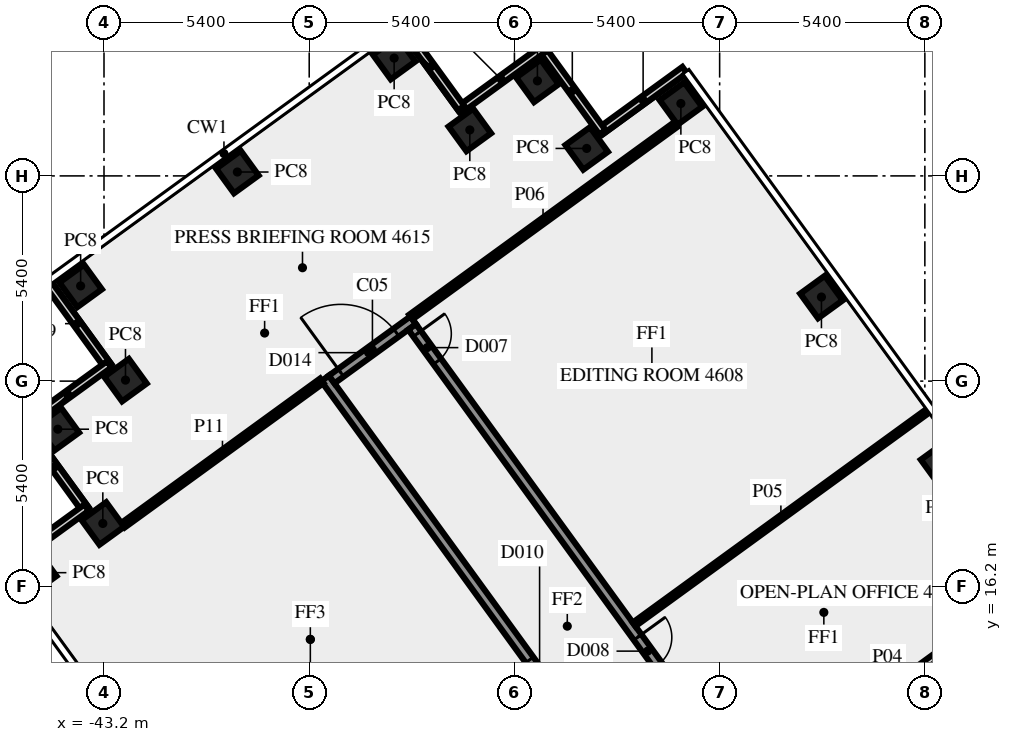
"""IFC4 building model, lengths in metres.
Left out: names, types, materials, properties, quantities, classifications, styles, units other than length and angle.
Written with IfcOpenShell. Run it as: python <this file> out.ifc"""

import sys

from ifc_helpers import new_model, si_unit, direction, frame, frame_2d, origin, origin_2d, place, context, subcontext, project, spatial, rectangle, extrude, element, fill, save


model = new_model("IFC4")
c1 = context("Model", 3, precision=1e-05, world=origin(), true_north=direction((0.0, 1.0)))
c2 = subcontext(c1, "Body", "Model", "MODEL_VIEW")
j1 = project(units=[si_unit("LENGTHUNIT", "METRE"), si_unit("PLANEANGLEUNIT", "RADIAN")], contexts=[c1])
p1 = place(None, origin())
s1 = spatial("IfcSite", under=j1, at=p1, CompositionType="ELEMENT")
p2 = place(p1, origin())
s2 = spatial("IfcBuilding", under=s1, at=p2, CompositionType="ELEMENT")
p3 = place(p2, frame((0.0, 0.0, 198.0)))
s3 = spatial("IfcBuildingStorey", under=s2, at=p3, CompositionType="ELEMENT", Elevation=198.0)
for number, where, z_axis, x_axis in (
    (1, (-21.147, 19.444, 0.0), (0.0, 0.0, 1.0), (-0.588, 0.809, 0.0)),
    (2, (-24.321, 23.812, 0.0), (0.0, 0.0, 1.0), (-0.588, 0.809, 0.0)),
    (3, (-28.02, 28.905, 0.0), (0.0, 0.0, 1.0), (-0.809, -0.588, 0.0)),
    (4, (-30.499, 27.723, 0.0), (0.0, 0.0, 1.0), (-0.809, -0.588, 0.0)),
    (5, (-31.795, 29.5, 0.0), (0.0, 0.0, 1.0), (-0.588, 0.809, 0.0)),
    (6, (-33.574, 28.209, 0.0), (0.0, 0.0, 1.0), (-0.588, 0.809, 0.0)),
    (7, (-35.565, 30.1, 0.0), (0.0, 0.0, 1.0), (-0.809, -0.588, 0.0)),
    (8, (-39.691, 27.102, 0.0), (0.0, 0.0, 1.0), (-0.809, -0.588, 0.0)),
    (9, (-43.815, 24.105, 0.0), (0.0, 0.0, 1.0), (-0.809, -0.588, 0.0)),
    (10, (-42.635, 21.626, 0.0), (0.0, 0.0, 1.0), (-0.809, -0.588, 0.0)),
    (11, (-44.415, 20.335, 0.0), (0.0, 0.0, 1.0), (0.588, -0.809, 0.0)),
    (12, (-43.231, 17.854, 0.0), (0.0, 0.0, 1.0), (0.588, -0.809, 0.0)),
    (13, (-45.01, 16.56, 0.0), (0.0, 0.0, 1.0), (0.588, -0.809, 0.0)),
):
    element("IfcColumn", number, at=place(p3, frame(where, z_axis=z_axis, x_axis=x_axis)), inside=s3, PredefinedType="COLUMN", context=c2, shape_type="SweptSolid", body=[
        extrude(rectangle(XDim=0.8, YDim=0.8, at=origin_2d()), origin(), (0.0, 0.0, 1.0), 3.65),
    ])
for number, where, z_axis, x_axis in (
    (14, (-27.921, 29.787, 0.0), (0.0, 0.0, 1.0), (-0.809, -0.588, 0.0)),
    (15, (-30.083, 28.149, 0.0), (0.0, 0.0, 1.0), (-0.588, 0.809, 0.0)),
    (16, (-31.654, 30.331, 0.0), (0.0, 0.0, 1.0), (-0.809, -0.588, 0.0)),
    (17, (-33.801, 28.786, 0.0), (0.0, 0.0, 1.0), (-0.588, 0.809, 0.0)),
    (18, (-44.699, 24.205, 0.0), (0.0, 0.0, 1.0), (0.588, -0.809, 0.0)),
    (19, (-43.061, 22.043, 0.0), (0.0, 0.0, 1.0), (-0.809, -0.588, 0.0)),
    (20, (-45.296, 20.434, 0.0), (0.0, 0.0, 1.0), (0.588, -0.809, 0.0)),
    (21, (-43.658, 18.272, 0.0), (0.0, 0.0, 1.0), (-0.809, -0.588, 0.0)),
):
    element("IfcWall", number, at=place(p3, frame(where, z_axis=z_axis, x_axis=x_axis)), inside=s3, PredefinedType="SOLIDWALL", context=c2, shape_type="SweptSolid", body=[
        extrude(rectangle(XDim=2.7, YDim=0.2, at=frame_2d((1.35, 0.0))), origin(), (0.0, 0.0, 1.0), 3.65),
    ])
p4 = place(p3, frame((-20.531, -1.523, 0.0), z_axis=(0.0, 0.0, 1.0), x_axis=(-0.587785812891, 0.809016587076, 0.0)))
e22 = element("IfcWall", 22, at=p4, inside=s3, PredefinedType="SOLIDWALL", context=c2, shape_type="SweptSolid", body=[
    extrude(rectangle(XDim=28.67, YDim=0.25, at=frame_2d((14.335, 0.0))), origin(), (0.0, 0.0, 1.0), 3.65),
])
p5 = place(p4, frame((17.015, 0.0, 0.0)))
e23 = element("IfcOpeningElement", 23, at=p5, cuts=e22, PredefinedType="OPENING", context=c2, shape_type="SweptSolid", body=[
    extrude(rectangle(XDim=0.9, YDim=2.1, at=frame_2d((0.45, 1.05))), frame((0.0, 0.135, 0.0), z_axis=(0.0, -1.0, 0.0), x_axis=(1.0, 0.0, 0.0)), (0.0, 0.0, 1.0), 0.27),
])
p6 = place(p4, frame((8.916, 0.0, 0.0)))
e24 = element("IfcOpeningElement", 24, at=p6, cuts=e22, PredefinedType="OPENING", context=c2, shape_type="SweptSolid", body=[
    extrude(rectangle(XDim=0.9, YDim=2.1, at=frame_2d((0.45, 1.05))), frame((0.0, 0.135, 0.0), z_axis=(0.0, -1.0, 0.0), x_axis=(1.0, 0.0, 0.0)), (0.0, 0.0, 1.0), 0.27),
])
p7 = place(p4, frame((18.616, 0.0, 0.0)))
e25 = element("IfcOpeningElement", 25, at=p7, cuts=e22, PredefinedType="OPENING", context=c2, shape_type="SweptSolid", body=[
    extrude(rectangle(XDim=0.9, YDim=2.1, at=frame_2d((0.45, 1.05))), frame((0.0, 0.135, 0.0), z_axis=(0.0, -1.0, 0.0), x_axis=(1.0, 0.0, 0.0)), (0.0, 0.0, 1.0), 0.27),
])
p8 = place(p4, frame((11.615, 0.0, 0.0)))
e26 = element("IfcOpeningElement", 26, at=p8, cuts=e22, PredefinedType="OPENING", context=c2, shape_type="SweptSolid", body=[
    extrude(rectangle(XDim=0.9, YDim=2.1, at=frame_2d((0.45, 1.05))), frame((0.0, 0.135, 0.0), z_axis=(0.0, -1.0, 0.0), x_axis=(1.0, 0.0, 0.0)), (0.0, 0.0, 1.0), 0.27),
])
p9 = place(p3, frame((-37.208, 21.644, 0.0), z_axis=(0.0, 0.0, 1.0), x_axis=(0.809038743598, 0.587755315891, 0.0)))
e27 = element("IfcWall", 27, at=p9, inside=s3, PredefinedType="SOLIDWALL", context=c2, shape_type="SweptSolid", body=[
    extrude(rectangle(XDim=2.65, YDim=0.25, at=frame_2d((1.325, 0.0))), origin(), (0.0, 0.0, 1.0), 3.65),
])
p10 = place(p9, frame((0.3, 0.0, 0.0)))
e28 = element("IfcOpeningElement", 28, at=p10, cuts=e27, PredefinedType="OPENING", context=c2, shape_type="SweptSolid", body=[
    extrude(rectangle(XDim=1.8, YDim=2.1, at=frame_2d((0.9, 1.05))), frame((0.0, 0.135, 0.0), z_axis=(0.0, -1.0, 0.0), x_axis=(1.0, 0.0, 0.0)), (0.0, 0.0, 1.0), 0.27),
])
p11 = place(p3, frame((-35.092, 23.027, 0.0), z_axis=(0.0, 0.0, 1.0), x_axis=(0.587784076945, -0.809017848313, 0.0)))
e29 = element("IfcWall", 29, at=p11, inside=s3, PredefinedType="SOLIDWALL", context=c2, shape_type="SweptSolid", body=[
    extrude(rectangle(XDim=29.853, YDim=0.25, at=frame_2d((14.927, 0.0))), origin(), (0.0, 0.0, 1.0), 3.65),
])
p12 = place(p11, frame((10.095, 0.0, 0.0)))
e30 = element("IfcOpeningElement", 30, at=p12, cuts=e29, PredefinedType="OPENING", context=c2, shape_type="SweptSolid", body=[
    extrude(rectangle(XDim=0.9, YDim=2.1, at=frame_2d((0.45, 1.05))), frame((0.0, 0.135, 0.0), z_axis=(0.0, -1.0, 0.0), x_axis=(1.0, 0.0, 0.0)), (0.0, 0.0, 1.0), 0.27),
])
p13 = place(p11, frame((15.495, 0.0, 0.0)))
e31 = element("IfcOpeningElement", 31, at=p13, cuts=e29, PredefinedType="OPENING", context=c2, shape_type="SweptSolid", body=[
    extrude(rectangle(XDim=0.9, YDim=2.1, at=frame_2d((0.45, 1.05))), frame((0.0, 0.135, 0.0), z_axis=(0.0, -1.0, 0.0), x_axis=(1.0, 0.0, 0.0)), (0.0, 0.0, 1.0), 0.27),
])
p14 = place(p11, frame((0.224, 0.0, 0.0)))
e32 = element("IfcOpeningElement", 32, at=p14, cuts=e29, PredefinedType="OPENING", context=c2, shape_type="SweptSolid", body=[
    extrude(rectangle(XDim=0.9, YDim=2.1, at=frame_2d((0.45, 1.05))), frame((0.0, 0.135, 0.0), z_axis=(0.0, -1.0, 0.0), x_axis=(1.0, 0.0, 0.0)), (0.0, 0.0, 1.0), 0.27),
])
p15 = place(p3, frame((-26.089, 10.848, 0.0), z_axis=(0.0, 0.0, 1.0), x_axis=(0.807661302092, 0.589646691759, 0.0)))
e33 = element("IfcWall", 33, at=p15, inside=s3, PredefinedType="SOLIDWALL", context=c2, shape_type="SweptSolid", body=[
    extrude(rectangle(XDim=9.55, YDim=0.2, at=frame_2d((4.775, 0.0))), origin(), (0.0, 0.0, 1.0), 2.85),
])
p16 = place(p3, frame((-21.525, 20.813, 0.0), z_axis=(0.0, 0.0, 1.0), x_axis=(-0.808994684961, -0.587815957341, 0.0)))
e34 = element("IfcWall", 34, at=p16, inside=s3, PredefinedType="PARTITIONING", context=c2, shape_type="SweptSolid", body=[
    extrude(rectangle(XDim=9.55, YDim=0.12, at=frame_2d((4.775, 0.0))), origin(), (0.0, 0.0, 1.0), 2.85),
])
p17 = place(p3, frame((-28.168, 28.341, 0.0), z_axis=(0.0, 0.0, 1.0), x_axis=(-0.809030614944, -0.58776650473, 0.0)))
e35 = element("IfcWall", 35, at=p17, inside=s3, PredefinedType="PARTITIONING", context=c2, shape_type="SweptSolid", body=[
    extrude(rectangle(XDim=8.6, YDim=0.15, at=frame_2d((4.3, 0.0))), origin(), (0.0, 0.0, 1.0), 3.65),
])
p18 = place(p3, frame((-42.698, 17.81, 0.0), z_axis=(0.0, 0.0, 1.0), x_axis=(0.80901688725, 0.587785399737, 0.0)))
e36 = element("IfcWall", 36, at=p18, inside=s3, PredefinedType="PARTITIONING", context=c2, shape_type="SweptSolid", body=[
    extrude(rectangle(XDim=6.465, YDim=0.15, at=frame_2d((3.232, 0.0))), origin(), (0.0, 0.0, 1.0), 3.65),
])
p19 = place(p12, origin())
e37 = element("IfcDoor", 37, at=p19, inside=s3, OperationType="SINGLE_SWING_LEFT", PredefinedType="DOOR", context=c2, shape_type="SweptSolid", body=[
    extrude(rectangle(XDim=0.9, YDim=2.1, at=frame_2d((0.45, 1.05))), frame((0.0, 0.025, 0.0), z_axis=(0.0, -1.0, 0.0), x_axis=(1.0, 0.0, 0.0)), (0.0, 0.0, 1.0), 0.05),
])
fill(e30, e37)
p20 = place(p14, origin())
e38 = element("IfcDoor", 38, at=p20, inside=s3, OperationType="SINGLE_SWING_LEFT", PredefinedType="DOOR", context=c2, shape_type="SweptSolid", body=[
    extrude(rectangle(XDim=0.9, YDim=2.1, at=frame_2d((0.45, 1.05))), frame((0.0, 0.025, 0.0), z_axis=(0.0, -1.0, 0.0), x_axis=(1.0, 0.0, 0.0)), (0.0, 0.0, 1.0), 0.05),
])
fill(e32, e38)
p21 = place(p10, origin())
e39 = element("IfcDoor", 39, at=p21, inside=s3, OperationType="DOUBLE_DOOR_SINGLE_SWING", PredefinedType="DOOR", context=c2, shape_type="SweptSolid", body=[
    extrude(rectangle(XDim=1.8, YDim=2.1, at=frame_2d((0.9, 1.05))), frame((0.0, 0.025, 0.0), z_axis=(0.0, -1.0, 0.0), x_axis=(1.0, 0.0, 0.0)), (0.0, 0.0, 1.0), 0.05),
])
fill(e28, e39)
p22 = place(p7, origin())
e40 = element("IfcDoor", 40, at=p22, inside=s3, OperationType="SINGLE_SWING_LEFT", PredefinedType="DOOR", context=c2, shape_type="SweptSolid", body=[
    extrude(rectangle(XDim=0.9, YDim=2.1, at=frame_2d((0.45, 1.05))), frame((0.0, 0.025, 0.0), z_axis=(0.0, -1.0, 0.0), x_axis=(1.0, 0.0, 0.0)), (0.0, 0.0, 1.0), 0.05),
])
fill(e25, e40)
save(model, sys.argv[1])
